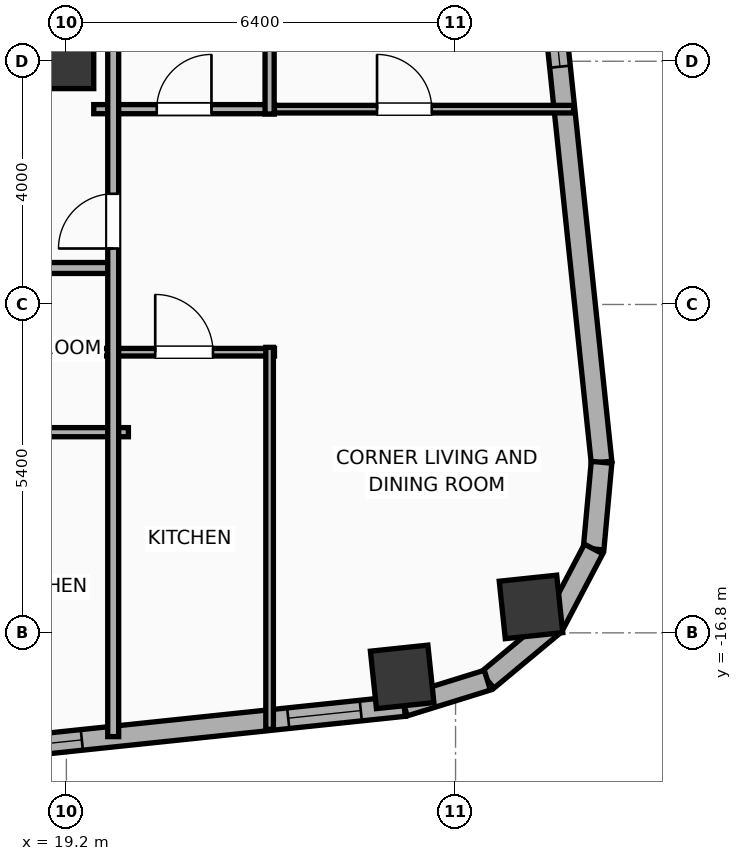
"""IFC4 building model, lengths in metres.
Left out: names, types, materials, properties, quantities, classifications, styles, units other than length and angle.
Written with IfcOpenShell. Run it as: python <this file> out.ifc"""

import sys

from ifc_helpers import new_model, si_unit, direction, frame, frame_2d, origin, origin_2d, place, context, subcontext, project, spatial, rectangle, hollow_rectangle, hollow_circle, extrude, element, fill, save


model = new_model("IFC4")
c1 = context("Model", 3, precision=1e-05, world=origin(), true_north=direction((0.0, 1.0)))
c2 = subcontext(c1, "Body", "Model", "MODEL_VIEW")
j1 = project(units=[si_unit("LENGTHUNIT", "METRE"), si_unit("PLANEANGLEUNIT", "RADIAN")], contexts=[c1])
p1 = place(None, origin())
s1 = spatial("IfcSite", under=j1, at=p1, CompositionType="ELEMENT")
p2 = place(p1, origin())
s2 = spatial("IfcBuilding", under=s1, at=p2, CompositionType="ELEMENT")
p3 = place(p2, frame((0.0, 0.0, 175.5)))
s3 = spatial("IfcBuildingStorey", under=s2, at=p3, CompositionType="ELEMENT", Elevation=175.5)
p4 = place(p3, frame((19.2, -7.4, 0.0), z_axis=(0.0, 0.0, 1.0), x_axis=(1.0, 0.0, 0.0)))
e1 = element("IfcColumn", 1, at=p4, inside=s3, PredefinedType="COLUMN", context=c2, shape_type="SweptSolid", body=[
    extrude(rectangle(XDim=0.9, YDim=0.9, at=origin_2d()), origin(), (0.0, 0.0, 1.0), 3.9),
])
p5 = place(p3, frame((12.175, -7.4, 0.0), z_axis=(0.0, 0.0, 1.0), x_axis=(1.0, 0.0, 0.0)))
e2 = element("IfcWall", 2, at=p5, inside=s3, PredefinedType="SHEAR", context=c2, shape_type="SweptSolid", body=[
    extrude(rectangle(XDim=7.25, YDim=0.45, at=frame_2d((3.625, 0.0))), origin(), (0.0, 0.0, 1.0), 3.65),
])
p6 = place(p3, frame((19.145, -7.4, 0.0), z_axis=(0.0, 0.0, 1.0), x_axis=(0.0, 1.0, 0.0)))
e3 = element("IfcWall", 3, at=p6, inside=s3, PredefinedType="SHEAR", context=c2, shape_type="SweptSolid", body=[
    extrude(rectangle(XDim=14.8, YDim=0.65, at=frame_2d((7.4, 0.0))), origin(), (0.0, 0.0, 1.0), 3.65),
])
p7 = place(p3, frame((24.722, -17.524, 0.0), z_axis=(0.0, 0.0, 1.0), x_axis=(0.994521895368, 0.104528463268, 0.0)))
e4 = element("IfcColumn", 4, at=p7, inside=s3, PredefinedType="COLUMN", context=c2, shape_type="SweptSolid", body=[
    extrude(hollow_rectangle(XDim=0.95, YDim=0.95, WallThickness=0.032, at=origin_2d()), origin(), (0.0, 0.0, 1.0), 3.9),
])
p8 = place(p3, frame((26.841, -16.374, 0.0), z_axis=(0.0, 0.0, 1.0), x_axis=(0.994521895368, 0.104528463268, 0.0)))
e5 = element("IfcColumn", 5, at=p8, inside=s3, PredefinedType="COLUMN", context=c2, shape_type="SweptSolid", body=[
    extrude(hollow_circle(Radius=0.475, WallThickness=0.032, at=origin_2d()), origin(), (0.0, 0.0, 1.0), 3.9),
])
p9 = place(p3, frame((24.756, -18.003, 0.0), z_axis=(0.0, 0.0, 1.0), x_axis=(-0.99452160744, -0.104531202687, 0.0)))
e6 = element("IfcWall", 6, at=p9, inside=s3, PredefinedType="ELEMENTEDWALL", context=c2, shape_type="SweptSolid", body=[
    extrude(rectangle(XDim=51.967, YDim=0.34, at=frame_2d((25.983, 0.0))), origin(), (0.0, 0.0, 1.0), 3.65),
])
p10 = place(p9, frame((25.633, 0.0, 0.75)))
e7 = element("IfcOpeningElement", 7, at=p10, cuts=e6, PredefinedType="OPENING", context=c2, shape_type="SweptSolid", body=[
    extrude(rectangle(XDim=2.4, YDim=2.1, at=frame_2d((1.2, 1.05))), frame((0.0, 0.18, 0.0), z_axis=(0.0, -1.0, 0.0), x_axis=(1.0, 0.0, 0.0)), (0.0, 0.0, 1.0), 0.36),
])
p11 = place(p9, frame((42.318, 0.0, 0.75)))
e8 = element("IfcOpeningElement", 8, at=p11, cuts=e6, PredefinedType="OPENING", context=c2, shape_type="SweptSolid", body=[
    extrude(rectangle(XDim=1.2, YDim=2.05, at=frame_2d((0.6, 1.025))), frame((0.0, 0.18, 0.0), z_axis=(0.0, -1.0, 0.0), x_axis=(1.0, 0.0, 0.0)), (0.0, 0.0, 1.0), 0.36),
])
p12 = place(p9, frame((34.121, 0.0, 0.75)))
e9 = element("IfcOpeningElement", 9, at=p12, cuts=e6, PredefinedType="OPENING", context=c2, shape_type="SweptSolid", body=[
    extrude(rectangle(XDim=1.2, YDim=2.05, at=frame_2d((0.6, 1.025))), frame((0.0, 0.18, 0.0), z_axis=(0.0, -1.0, 0.0), x_axis=(1.0, 0.0, 0.0)), (0.0, 0.0, 1.0), 0.36),
])
p13 = place(p9, frame((37.092, 0.0, 0.75)))
e10 = element("IfcOpeningElement", 10, at=p13, cuts=e6, PredefinedType="OPENING", context=c2, shape_type="SweptSolid", body=[
    extrude(rectangle(XDim=1.2, YDim=2.05, at=frame_2d((0.6, 1.025))), frame((0.0, 0.18, 0.0), z_axis=(0.0, -1.0, 0.0), x_axis=(1.0, 0.0, 0.0)), (0.0, 0.0, 1.0), 0.36),
])
p14 = place(p9, frame((14.359, 0.0, 0.75)))
e11 = element("IfcOpeningElement", 11, at=p14, cuts=e6, PredefinedType="OPENING", context=c2, shape_type="SweptSolid", body=[
    extrude(rectangle(XDim=1.2, YDim=2.05, at=frame_2d((0.6, 1.025))), frame((0.0, 0.18, 0.0), z_axis=(0.0, -1.0, 0.0), x_axis=(1.0, 0.0, 0.0)), (0.0, 0.0, 1.0), 0.36),
])
p15 = place(p9, frame((11.388, 0.0, 0.75)))
e12 = element("IfcOpeningElement", 12, at=p15, cuts=e6, PredefinedType="OPENING", context=c2, shape_type="SweptSolid", body=[
    extrude(rectangle(XDim=1.2, YDim=2.05, at=frame_2d((0.6, 1.025))), frame((0.0, 0.18, 0.0), z_axis=(0.0, -1.0, 0.0), x_axis=(1.0, 0.0, 0.0)), (0.0, 0.0, 1.0), 0.36),
])
p16 = place(p9, frame((8.332, 0.0, 0.75)))
e13 = element("IfcOpeningElement", 13, at=p16, cuts=e6, PredefinedType="OPENING", context=c2, shape_type="SweptSolid", body=[
    extrude(rectangle(XDim=1.2, YDim=2.05, at=frame_2d((0.6, 1.025))), frame((0.0, 0.18, 0.0), z_axis=(0.0, -1.0, 0.0), x_axis=(1.0, 0.0, 0.0)), (0.0, 0.0, 1.0), 0.36),
])
p17 = place(p9, frame((5.331, 0.0, 0.75)))
e14 = element("IfcOpeningElement", 14, at=p17, cuts=e6, PredefinedType="OPENING", context=c2, shape_type="SweptSolid", body=[
    extrude(rectangle(XDim=1.2, YDim=2.05, at=frame_2d((0.6, 1.025))), frame((0.0, 0.18, 0.0), z_axis=(0.0, -1.0, 0.0), x_axis=(1.0, 0.0, 0.0)), (0.0, 0.0, 1.0), 0.36),
])
p18 = place(p9, frame((29.313, 0.0, 0.75)))
e15 = element("IfcOpeningElement", 15, at=p18, cuts=e6, PredefinedType="OPENING", context=c2, shape_type="SweptSolid", body=[
    extrude(rectangle(XDim=1.2, YDim=2.05, at=frame_2d((0.6, 1.025))), frame((0.0, 0.18, 0.0), z_axis=(0.0, -1.0, 0.0), x_axis=(1.0, 0.0, 0.0)), (0.0, 0.0, 1.0), 0.36),
])
p19 = place(p9, frame((22.248, 0.0, 0.75)))
e16 = element("IfcOpeningElement", 16, at=p19, cuts=e6, PredefinedType="OPENING", context=c2, shape_type="SweptSolid", body=[
    extrude(rectangle(XDim=1.2, YDim=2.05, at=frame_2d((0.6, 1.025))), frame((0.0, 0.18, 0.0), z_axis=(0.0, -1.0, 0.0), x_axis=(1.0, 0.0, 0.0)), (0.0, 0.0, 1.0), 0.36),
])
p20 = place(p9, frame((18.186, 0.0, 0.75)))
e17 = element("IfcOpeningElement", 17, at=p20, cuts=e6, PredefinedType="OPENING", context=c2, shape_type="SweptSolid", body=[
    extrude(rectangle(XDim=1.2, YDim=2.05, at=frame_2d((0.6, 1.025))), frame((0.0, 0.18, 0.0), z_axis=(0.0, -1.0, 0.0), x_axis=(1.0, 0.0, 0.0)), (0.0, 0.0, 1.0), 0.36),
])
p21 = place(p9, frame((48.13, 0.0, 0.75)))
e18 = element("IfcOpeningElement", 18, at=p21, cuts=e6, PredefinedType="OPENING", context=c2, shape_type="SweptSolid", body=[
    extrude(rectangle(XDim=1.2, YDim=2.05, at=frame_2d((0.6, 1.025))), frame((0.0, 0.18, 0.0), z_axis=(0.0, -1.0, 0.0), x_axis=(1.0, 0.0, 0.0)), (0.0, 0.0, 1.0), 0.36),
])
p22 = place(p9, frame((50.09, 0.0, 0.75)))
e19 = element("IfcOpeningElement", 19, at=p22, cuts=e6, PredefinedType="OPENING", context=c2, shape_type="SweptSolid", body=[
    extrude(rectangle(XDim=1.2, YDim=2.05, at=frame_2d((0.6, 1.025))), frame((0.0, 0.18, 0.0), z_axis=(0.0, -1.0, 0.0), x_axis=(1.0, 0.0, 0.0)), (0.0, 0.0, 1.0), 0.36),
])
p23 = place(p9, frame((0.718, 0.0, 0.75)))
e20 = element("IfcOpeningElement", 20, at=p23, cuts=e6, PredefinedType="OPENING", context=c2, shape_type="SweptSolid", body=[
    extrude(rectangle(XDim=1.2, YDim=2.05, at=frame_2d((0.6, 1.025))), frame((0.0, 0.18, 0.0), z_axis=(0.0, -1.0, 0.0), x_axis=(1.0, 0.0, 0.0)), (0.0, 0.0, 1.0), 0.36),
])
p24 = place(p3, frame((24.534, 18.99, 0.0), z_axis=(0.0, 0.0, 1.0), x_axis=(0.104534959766, -0.994521212537, 0.0)))
e21 = element("IfcWall", 21, at=p24, inside=s3, PredefinedType="ELEMENTEDWALL", context=c2, shape_type="SweptSolid", body=[
    extrude(rectangle(XDim=33.166, YDim=0.34, at=frame_2d((16.583, 0.0))), origin(), (0.0, 0.0, 1.0), 3.65),
])
p25 = place(p24, frame((6.542, 0.0, 0.75)))
e22 = element("IfcOpeningElement", 22, at=p25, cuts=e21, PredefinedType="OPENING", context=c2, shape_type="SweptSolid", body=[
    extrude(rectangle(XDim=1.8, YDim=2.1, at=frame_2d((0.9, 1.05))), frame((0.0, 0.18, 0.0), z_axis=(0.0, -1.0, 0.0), x_axis=(1.0, 0.0, 0.0)), (0.0, 0.0, 1.0), 0.36),
])
p26 = place(p24, frame((24.825, 0.0, 0.75)))
e23 = element("IfcOpeningElement", 23, at=p26, cuts=e21, PredefinedType="OPENING", context=c2, shape_type="SweptSolid", body=[
    extrude(rectangle(XDim=1.8, YDim=2.1, at=frame_2d((0.9, 1.05))), frame((0.0, 0.18, 0.0), z_axis=(0.0, -1.0, 0.0), x_axis=(1.0, 0.0, 0.0)), (0.0, 0.0, 1.0), 0.36),
])
p27 = place(p3, frame((28.001, -13.995, 0.0), z_axis=(0.0, 0.0, 1.0), x_axis=(-0.091534682358, -0.995801888894, 0.0)))
e24 = element("IfcWall", 24, at=p27, inside=s3, PredefinedType="ELEMENTEDWALL", context=c2, shape_type="SweptSolid", body=[
    extrude(rectangle(XDim=1.432, YDim=0.34, at=frame_2d((0.716, 0.0))), origin(), (0.0, 0.0, 1.0), 3.65),
])
for number, where, z_axis, x_axis in (
    (25, (27.87, -15.421, 0.0), (0.0, 0.0, 1.0), (-0.466, -0.885, 0.0)),
    (26, (27.211, -16.674, 0.0), (0.0, 0.0, 1.0), (-0.769, -0.64, 0.0)),
):
    element("IfcWall", number, at=place(p3, frame(where, z_axis=z_axis, x_axis=x_axis)), inside=s3, PredefinedType="ELEMENTEDWALL", context=c2, shape_type="SweptSolid", body=[
        extrude(rectangle(XDim=1.415, YDim=0.34, at=frame_2d((0.708, 0.0))), origin(), (0.0, 0.0, 1.0), 3.65),
    ])
p28 = place(p3, frame((26.123, -17.579, 0.0), z_axis=(0.0, 0.0, 1.0), x_axis=(-0.955042500381, -0.296468923271, 0.0)))
e27 = element("IfcWall", 27, at=p28, inside=s3, PredefinedType="ELEMENTEDWALL", context=c2, shape_type="SweptSolid", body=[
    extrude(rectangle(XDim=1.432, YDim=0.34, at=frame_2d((0.716, 0.0))), origin(), (0.0, 0.0, 1.0), 3.65),
])
p29 = place(p3, frame((17.67, -13.5, 0.0), z_axis=(0.0, 0.0, 1.0), x_axis=(1.0, 0.0, 0.0)))
e28 = element("IfcWall", 28, at=p29, inside=s3, PredefinedType="PLUMBINGWALL", context=c2, shape_type="SweptSolid", body=[
    extrude(rectangle(XDim=2.55, YDim=0.15, at=frame_2d((1.275, 0.0))), origin(), (0.0, 0.0, 1.0), 3.65),
])
p30 = place(p3, frame((8.08, -10.8, 0.0), z_axis=(0.0, 0.0, 1.0), x_axis=(1.0, 0.0, 0.0)))
e29 = element("IfcWall", 29, at=p30, inside=s3, PredefinedType="PARTITIONING", context=c2, shape_type="SweptSolid", body=[
    extrude(rectangle(XDim=11.92, YDim=0.18, at=frame_2d((5.96, 0.0))), origin(), (0.0, 0.0, 1.0), 3.65),
])
p31 = place(p30, frame((1.251, 0.0, 0.0)))
e30 = element("IfcOpeningElement", 30, at=p31, cuts=e29, PredefinedType="OPENING", context=c2, shape_type="SweptSolid", body=[
    extrude(rectangle(XDim=1.15, YDim=2.05, at=frame_2d((0.575, 1.025))), frame((0.0, 0.1, 0.0), z_axis=(0.0, -1.0, 0.0), x_axis=(1.0, 0.0, 0.0)), (0.0, 0.0, 1.0), 0.2),
])
p32 = place(p30, frame((7.244, 0.0, 0.0)))
e31 = element("IfcOpeningElement", 31, at=p32, cuts=e29, PredefinedType="OPENING", context=c2, shape_type="SweptSolid", body=[
    extrude(rectangle(XDim=1.15, YDim=2.05, at=frame_2d((0.575, 1.025))), frame((0.0, 0.1, 0.0), z_axis=(0.0, -1.0, 0.0), x_axis=(1.0, 0.0, 0.0)), (0.0, 0.0, 1.0), 0.2),
])
p33 = place(p3, frame((22.482, -8.188, 0.0), z_axis=(0.0, 0.0, 1.0), x_axis=(1.0, 0.0, 0.0)))
e32 = element("IfcWall", 32, at=p33, inside=s3, PredefinedType="PARTITIONING", context=c2, shape_type="SweptSolid", body=[
    extrude(rectangle(XDim=5.06, YDim=0.125, at=frame_2d((2.53, 0.0))), origin(), (0.0, 0.0, 1.0), 3.65),
])
p34 = place(p33, frame((1.827, 0.0, 0.0)))
e33 = element("IfcOpeningElement", 33, at=p34, cuts=e32, PredefinedType="OPENING", context=c2, shape_type="SweptSolid", body=[
    extrude(rectangle(XDim=0.9, YDim=2.05, at=frame_2d((0.45, 1.025))), frame((0.0, 0.073, 0.0), z_axis=(0.0, -1.0, 0.0), x_axis=(1.0, 0.0, 0.0)), (0.0, 0.0, 1.0), 0.145),
])
p35 = place(p3, frame((19.65, -12.185, 0.0), z_axis=(0.0, 0.0, 1.0), x_axis=(1.0, 0.0, 0.0)))
e34 = element("IfcWall", 34, at=p35, inside=s3, PredefinedType="PARTITIONING", context=c2, shape_type="SweptSolid", body=[
    extrude(rectangle(XDim=2.972, YDim=0.125, at=frame_2d((1.486, 0.0))), origin(), (0.0, 0.0, 1.0), 3.65),
])
p36 = place(p35, frame((1.011, 0.0, 0.0)))
e35 = element("IfcOpeningElement", 35, at=p36, cuts=e34, PredefinedType="OPENING", context=c2, shape_type="SweptSolid", body=[
    extrude(rectangle(XDim=0.95, YDim=2.05, at=frame_2d((0.475, 1.025))), frame((0.0, 0.073, 0.0), z_axis=(0.0, -1.0, 0.0), x_axis=(1.0, 0.0, 0.0)), (0.0, 0.0, 1.0), 0.145),
])
p37 = place(p3, frame((19.65, -8.188, 0.0), z_axis=(0.0, 0.0, 1.0), x_axis=(1.0, 0.0, 0.0)))
e36 = element("IfcWall", 36, at=p37, inside=s3, PredefinedType="PLUMBINGWALL", context=c2, shape_type="SweptSolid", body=[
    extrude(rectangle(XDim=2.972, YDim=0.15, at=frame_2d((1.486, 0.0))), origin(), (0.0, 0.0, 1.0), 3.65),
])
p38 = place(p37, frame((1.036, 0.0, 0.0)))
e37 = element("IfcOpeningElement", 37, at=p38, cuts=e36, PredefinedType="OPENING", context=c2, shape_type="SweptSolid", body=[
    extrude(rectangle(XDim=0.9, YDim=2.05, at=frame_2d((0.45, 1.025))), frame((0.0, 0.085, 0.0), z_axis=(0.0, -1.0, 0.0), x_axis=(1.0, 0.0, 0.0)), (0.0, 0.0, 1.0), 0.17),
])
p39 = place(p3, frame((22.542, -18.387, 0.0), z_axis=(0.0, 0.0, 1.0), x_axis=(0.0, 1.0, 0.0)))
e38 = element("IfcWall", 38, at=p39, inside=s3, PredefinedType="PARTITIONING", context=c2, shape_type="SweptSolid", body=[
    extrude(rectangle(XDim=6.282, YDim=0.125, at=frame_2d((3.141, 0.0))), origin(), (0.0, 0.0, 1.0), 3.65),
])
p40 = place(p3, frame((22.542, -8.268, 0.0), z_axis=(0.0, 0.0, 1.0), x_axis=(0.0, 1.0, 0.0)))
e39 = element("IfcWall", 39, at=p40, inside=s3, PredefinedType="PLUMBINGWALL", context=c2, shape_type="SweptSolid", body=[
    extrude(rectangle(XDim=6.448, YDim=0.15, at=frame_2d((3.224, 0.0))), origin(), (0.0, 0.0, 1.0), 3.65),
])
p41 = place(p3, frame((19.97, -18.506, 0.0), z_axis=(0.0, 0.0, 1.0), x_axis=(0.0, 1.0, 0.0)))
e40 = element("IfcWall", 40, at=p41, inside=s3, PredefinedType="PARTITIONING", context=c2, shape_type="SweptSolid", body=[
    extrude(rectangle(XDim=16.706, YDim=0.18, at=frame_2d((8.353, 0.0))), origin(), (0.0, 0.0, 1.0), 3.65),
])
p42 = place(p41, frame((8.027, 0.0, 0.0)))
e41 = element("IfcOpeningElement", 41, at=p42, cuts=e40, PredefinedType="OPENING", context=c2, shape_type="SweptSolid", body=[
    extrude(rectangle(XDim=0.9, YDim=2.05, at=frame_2d((0.45, 1.025))), frame((0.0, 0.1, 0.0), z_axis=(0.0, -1.0, 0.0), x_axis=(1.0, 0.0, 0.0)), (0.0, 0.0, 1.0), 0.2),
])
p43 = place(p26, origin())
e42 = element("IfcWindow", 42, at=p43, inside=s3, PartitioningType="SINGLE_PANEL", PredefinedType="WINDOW", context=c2, shape_type="SweptSolid", body=[
    extrude(rectangle(XDim=1.8, YDim=2.1, at=frame_2d((0.9, 1.05))), frame((0.0, 0.03, 0.0), z_axis=(0.0, -1.0, 0.0), x_axis=(1.0, 0.0, 0.0)), (0.0, 0.0, 1.0), 0.06),
])
fill(e23, e42)
p44 = place(p17, origin())
e43 = element("IfcWindow", 43, at=p44, inside=s3, PartitioningType="SINGLE_PANEL", PredefinedType="WINDOW", context=c2, shape_type="SweptSolid", body=[
    extrude(rectangle(XDim=1.2, YDim=2.05, at=frame_2d((0.6, 1.025))), frame((0.0, 0.03, 0.0), z_axis=(0.0, -1.0, 0.0), x_axis=(1.0, 0.0, 0.0)), (0.0, 0.0, 1.0), 0.06),
])
fill(e14, e43)
p45 = place(p23, origin())
e44 = element("IfcWindow", 44, at=p45, inside=s3, PartitioningType="SINGLE_PANEL", PredefinedType="WINDOW", context=c2, shape_type="SweptSolid", body=[
    extrude(rectangle(XDim=1.2, YDim=2.05, at=frame_2d((0.6, 1.025))), frame((0.0, 0.03, 0.0), z_axis=(0.0, -1.0, 0.0), x_axis=(1.0, 0.0, 0.0)), (0.0, 0.0, 1.0), 0.06),
])
fill(e20, e44)
p46 = place(p34, origin())
e45 = element("IfcDoor", 45, at=p46, inside=s3, OperationType="SINGLE_SWING_LEFT", PredefinedType="DOOR", context=c2, shape_type="SweptSolid", body=[
    extrude(rectangle(XDim=0.9, YDim=2.05, at=frame_2d((0.45, 1.025))), frame((0.0, 0.025, 0.0), z_axis=(0.0, -1.0, 0.0), x_axis=(1.0, 0.0, 0.0)), (0.0, 0.0, 1.0), 0.05),
])
fill(e33, e45)
p47 = place(p36, origin())
e46 = element("IfcDoor", 46, at=p47, inside=s3, OperationType="SINGLE_SWING_LEFT", PredefinedType="DOOR", context=c2, shape_type="SweptSolid", body=[
    extrude(rectangle(XDim=0.95, YDim=2.05, at=frame_2d((0.475, 1.025))), frame((0.0, 0.025, 0.0), z_axis=(0.0, -1.0, 0.0), x_axis=(1.0, 0.0, 0.0)), (0.0, 0.0, 1.0), 0.05),
])
fill(e35, e46)
p48 = place(p38, origin())
e47 = element("IfcDoor", 47, at=p48, inside=s3, OperationType="SINGLE_SWING_RIGHT", PredefinedType="DOOR", context=c2, shape_type="SweptSolid", body=[
    extrude(rectangle(XDim=0.9, YDim=2.05, at=frame_2d((0.45, 1.025))), frame((0.0, 0.025, 0.0), z_axis=(0.0, -1.0, 0.0), x_axis=(1.0, 0.0, 0.0)), (0.0, 0.0, 1.0), 0.05),
])
fill(e37, e47)
p49 = place(p42, origin())
e48 = element("IfcDoor", 48, at=p49, inside=s3, OperationType="SINGLE_SWING_LEFT", PredefinedType="DOOR", context=c2, shape_type="SweptSolid", body=[
    extrude(rectangle(XDim=0.9, YDim=2.05, at=frame_2d((0.45, 1.025))), frame((0.0, 0.025, 0.0), z_axis=(0.0, -1.0, 0.0), x_axis=(1.0, 0.0, 0.0)), (0.0, 0.0, 1.0), 0.05),
])
fill(e41, e48)
save(model, sys.argv[1])
